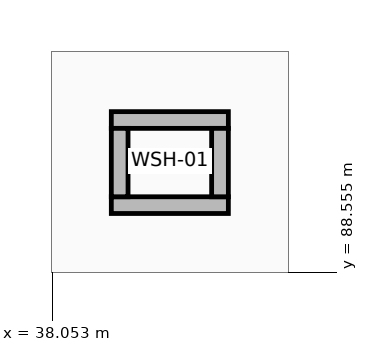
"""IFC4 building model, lengths in metres.
Left out: names, types, materials, properties, quantities, classifications, styles, units other than length and angle.
Written with IfcOpenShell. Run it as: python <this file> out.ifc"""

import sys

from ifc_helpers import new_model, si_unit, direction, frame, frame_2d, origin, place, context, subcontext, project, spatial, rectangle, extrude, element, save


model = new_model("IFC4")
c1 = context("Model", 3, precision=1e-05, world=origin(), true_north=direction((0.0, 1.0)))
c2 = subcontext(c1, "Body", "Model", "MODEL_VIEW")
j1 = project(units=[si_unit("LENGTHUNIT", "METRE"), si_unit("PLANEANGLEUNIT", "RADIAN")], contexts=[c1])
p1 = place(None, origin())
s1 = spatial("IfcSite", under=j1, at=p1, CompositionType="ELEMENT")
p2 = place(p1, origin())
s2 = spatial("IfcBuilding", under=s1, at=p2, CompositionType="ELEMENT")
p3 = place(p2, frame((0.0, 0.0, 9.0)))
s3 = spatial("IfcBuildingStorey", under=s2, at=p3, CompositionType="ELEMENT", Elevation=9.0)
for number, where, z_axis, x_axis in (
    (1, (38.83, 89.44, 0.0), (0.0, 0.0, 1.0), (1.0, 0.0, 0.0)),
    (2, (38.83, 90.56, 0.0), (0.0, 0.0, 1.0), (1.0, 0.0, 0.0)),
):
    element("IfcWall", number, at=place(p3, frame(where, z_axis=z_axis, x_axis=x_axis)), inside=s3, PredefinedType="STANDARD", context=c2, shape_type="SweptSolid", body=[
        extrude(rectangle(XDim=1.54, YDim=0.22, at=frame_2d((0.77, 0.0))), origin(), (0.0, 0.0, 1.0), 3.26),
    ])
for number, where, z_axis, x_axis in (
    (3, (38.94, 89.55, 0.0), (0.0, 0.0, 1.0), (0.0, 1.0, 0.0)),
    (4, (40.26, 89.55, 0.0), (0.0, 0.0, 1.0), (0.0, 1.0, 0.0)),
):
    element("IfcWall", number, at=place(p3, frame(where, z_axis=z_axis, x_axis=x_axis)), inside=s3, PredefinedType="STANDARD", context=c2, shape_type="SweptSolid", body=[
        extrude(rectangle(XDim=0.9, YDim=0.22, at=frame_2d((0.45, 0.0))), origin(), (0.0, 0.0, 1.0), 3.26),
    ])
save(model, sys.argv[1])
